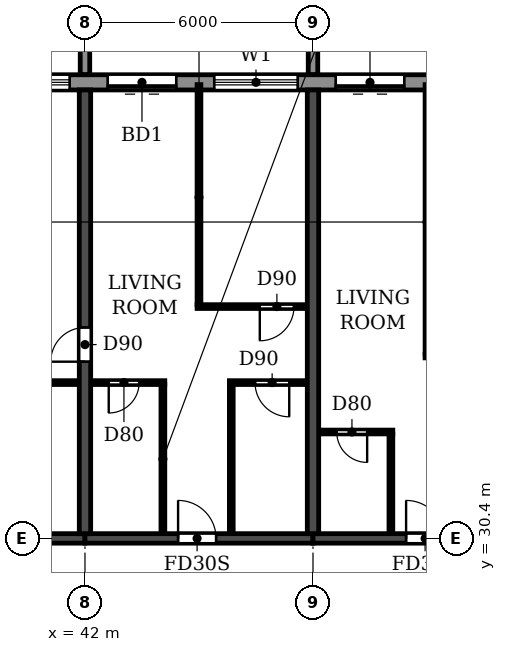
"""IFC4 building model, lengths in metres.
Left out: names, types, materials, properties, quantities, classifications, styles, units other than length and angle.
Written with IfcOpenShell. Run it as: python <this file> out.ifc"""

import sys

from ifc_helpers import new_model, si_unit, direction, frame, frame_2d, origin, place, context, subcontext, project, spatial, polyline, rectangle, outline, extrude, source, transform, mapped, element, fill, save


model = new_model("IFC4")
c1 = context("Model", 3, precision=1e-05, world=origin(), true_north=direction((0.0, 1.0)))
c2 = subcontext(c1, "Body", "Model", "MODEL_VIEW")
j1 = project(units=[si_unit("LENGTHUNIT", "METRE"), si_unit("PLANEANGLEUNIT", "RADIAN")], contexts=[c1])
p1 = place(None, origin())
s1 = spatial("IfcSite", under=j1, at=p1, CompositionType="ELEMENT")
p2 = place(p1, origin())
s2 = spatial("IfcBuilding", under=s1, at=p2, CompositionType="ELEMENT")
p3 = place(p2, frame((0.0, 0.0, 152.1)))
s3 = spatial("IfcBuildingStorey", under=s2, at=p3, CompositionType="ELEMENT", Elevation=152.1)
p4 = place(p3, frame((42.0, 30.525, 0.0), z_axis=(0.0, 0.0, 1.0), x_axis=(0.0, 1.0, 0.0)))
e1 = element("IfcWall", 1, at=p4, inside=s3, PredefinedType="SHEAR", context=c2, shape_type="SweptSolid", body=[
    extrude(rectangle(XDim=11.675, YDim=0.3, at=frame_2d((5.837, 0.0))), origin(), (0.0, 0.0, 1.0), 3.07),
])
p5 = place(p4, frame((4.525, 0.0, 0.0)))
e2 = element("IfcOpeningElement", 2, at=p5, cuts=e1, PredefinedType="OPENING", context=c2, shape_type="SweptSolid", body=[
    extrude(rectangle(XDim=0.9, YDim=2.1, at=frame_2d((0.45, 1.05))), frame((0.0, 0.16, 0.0), z_axis=(0.0, -1.0, 0.0), x_axis=(1.0, 0.0, 0.0)), (0.0, 0.0, 1.0), 0.32),
])
p6 = place(p3, frame((48.0, 30.525, 0.0), z_axis=(0.0, 0.0, 1.0), x_axis=(0.0, 1.0, 0.0)))
e3 = element("IfcWall", 3, at=p6, inside=s3, PredefinedType="SHEAR", context=c2, shape_type="SweptSolid", body=[
    extrude(rectangle(XDim=11.675, YDim=0.3, at=frame_2d((5.837, 0.0))), origin(), (0.0, 0.0, 1.0), 3.07),
])
p7 = place(p3, frame((36.0, 30.4, 0.0), z_axis=(0.0, 0.0, 1.0), x_axis=(1.0, 0.0, 0.0)))
e4 = element("IfcWall", 4, at=p7, inside=s3, PredefinedType="SHEAR", context=c2, shape_type="SweptSolid", body=[
    extrude(rectangle(XDim=6.0, YDim=0.25, at=frame_2d((3.0, 0.0))), origin(), (0.0, 0.0, 1.0), 2.47),
])
p8 = place(p3, frame((42.0, 30.4, 0.0), z_axis=(0.0, 0.0, 1.0), x_axis=(1.0, 0.0, 0.0)))
e5 = element("IfcWall", 5, at=p8, inside=s3, PredefinedType="SHEAR", context=c2, shape_type="SweptSolid", body=[
    extrude(rectangle(XDim=6.0, YDim=0.25, at=frame_2d((3.0, 0.0))), origin(), (0.0, 0.0, 1.0), 2.47),
])
p9 = place(p8, frame((2.45, 0.0, 0.0)))
e6 = element("IfcOpeningElement", 6, at=p9, cuts=e5, PredefinedType="OPENING", context=c2, shape_type="SweptSolid", body=[
    extrude(rectangle(XDim=1.0, YDim=2.1, at=frame_2d((0.5, 1.05))), frame((0.0, 0.135, 0.0), z_axis=(0.0, -1.0, 0.0), x_axis=(1.0, 0.0, 0.0)), (0.0, 0.0, 1.0), 0.27),
])
p10 = place(p3, frame((48.0, 30.4, 0.0), z_axis=(0.0, 0.0, 1.0), x_axis=(1.0, 0.0, 0.0)))
e7 = element("IfcWall", 7, at=p10, inside=s3, PredefinedType="SHEAR", context=c2, shape_type="SweptSolid", body=[
    extrude(rectangle(XDim=6.0, YDim=0.25, at=frame_2d((3.0, 0.0))), origin(), (0.0, 0.0, 1.0), 2.47),
])
p11 = place(p10, frame((2.45, 0.0, 0.0)))
e8 = element("IfcOpeningElement", 8, at=p11, cuts=e7, PredefinedType="OPENING", context=c2, shape_type="SweptSolid", body=[
    extrude(rectangle(XDim=1.0, YDim=2.1, at=frame_2d((0.5, 1.05))), frame((0.0, 0.135, 0.0), z_axis=(0.0, -1.0, 0.0), x_axis=(1.0, 0.0, 0.0)), (0.0, 0.0, 1.0), 0.27),
])
p12 = place(p3, frame((85.317, 42.4, 0.0), z_axis=(0.0, 0.0, 1.0), x_axis=(-1.0, 0.0, 0.0)))
e9 = element("IfcWall", 9, at=p12, inside=s3, PredefinedType="STANDARD", context=c2, shape_type="SweptSolid", body=[
    extrude(rectangle(XDim=68.634, YDim=0.4, at=frame_2d((34.317, 0.0))), origin(), (0.0, 0.0, 1.0), 3.07),
])
p13 = place(p12, frame((64.917, 0.0, 0.0)))
e10 = element("IfcOpeningElement", 10, at=p13, cuts=e9, PredefinedType="OPENING", context=c2, shape_type="SweptSolid", body=[
    extrude(rectangle(XDim=1.8, YDim=2.4, at=frame_2d((0.9, 1.2))), frame((0.0, 0.21, 0.0), z_axis=(0.0, -1.0, 0.0), x_axis=(1.0, 0.0, 0.0)), (0.0, 0.0, 1.0), 0.42),
])
p14 = place(p12, frame((61.717, 0.0, 0.9)))
e11 = element("IfcOpeningElement", 11, at=p14, cuts=e9, PredefinedType="OPENING", context=c2, shape_type="SweptSolid", body=[
    extrude(rectangle(XDim=2.2, YDim=1.5, at=frame_2d((1.1, 0.75))), frame((0.0, 0.21, 0.0), z_axis=(0.0, -1.0, 0.0), x_axis=(1.0, 0.0, 0.0)), (0.0, 0.0, 1.0), 0.42),
])
p15 = place(p12, frame((58.717, 0.0, 0.9)))
e12 = element("IfcOpeningElement", 12, at=p15, cuts=e9, PredefinedType="OPENING", context=c2, shape_type="SweptSolid", body=[
    extrude(rectangle(XDim=2.2, YDim=1.5, at=frame_2d((1.1, 0.75))), frame((0.0, 0.21, 0.0), z_axis=(0.0, -1.0, 0.0), x_axis=(1.0, 0.0, 0.0)), (0.0, 0.0, 1.0), 0.42),
])
p16 = place(p12, frame((55.917, 0.0, 0.0)))
e13 = element("IfcOpeningElement", 13, at=p16, cuts=e9, PredefinedType="OPENING", context=c2, shape_type="SweptSolid", body=[
    extrude(rectangle(XDim=1.8, YDim=2.4, at=frame_2d((0.9, 1.2))), frame((0.0, 0.21, 0.0), z_axis=(0.0, -1.0, 0.0), x_axis=(1.0, 0.0, 0.0)), (0.0, 0.0, 1.0), 0.42),
])
p17 = place(p12, frame((52.917, 0.0, 0.0)))
e14 = element("IfcOpeningElement", 14, at=p17, cuts=e9, PredefinedType="OPENING", context=c2, shape_type="SweptSolid", body=[
    extrude(rectangle(XDim=1.8, YDim=2.4, at=frame_2d((0.9, 1.2))), frame((0.0, 0.21, 0.0), z_axis=(0.0, -1.0, 0.0), x_axis=(1.0, 0.0, 0.0)), (0.0, 0.0, 1.0), 0.42),
])
p18 = place(p12, frame((49.717, 0.0, 0.9)))
e15 = element("IfcOpeningElement", 15, at=p18, cuts=e9, PredefinedType="OPENING", context=c2, shape_type="SweptSolid", body=[
    extrude(rectangle(XDim=2.2, YDim=1.5, at=frame_2d((1.1, 0.75))), frame((0.0, 0.21, 0.0), z_axis=(0.0, -1.0, 0.0), x_axis=(1.0, 0.0, 0.0)), (0.0, 0.0, 1.0), 0.42),
])
p19 = place(p12, frame((46.717, 0.0, 0.9)))
e16 = element("IfcOpeningElement", 16, at=p19, cuts=e9, PredefinedType="OPENING", context=c2, shape_type="SweptSolid", body=[
    extrude(rectangle(XDim=2.2, YDim=1.5, at=frame_2d((1.1, 0.75))), frame((0.0, 0.21, 0.0), z_axis=(0.0, -1.0, 0.0), x_axis=(1.0, 0.0, 0.0)), (0.0, 0.0, 1.0), 0.42),
])
p20 = place(p12, frame((43.717, 0.0, 0.9)))
e17 = element("IfcOpeningElement", 17, at=p20, cuts=e9, PredefinedType="OPENING", context=c2, shape_type="SweptSolid", body=[
    extrude(rectangle(XDim=2.2, YDim=1.5, at=frame_2d((1.1, 0.75))), frame((0.0, 0.21, 0.0), z_axis=(0.0, -1.0, 0.0), x_axis=(1.0, 0.0, 0.0)), (0.0, 0.0, 1.0), 0.42),
])
p21 = place(p12, frame((40.917, 0.0, 0.0)))
e18 = element("IfcOpeningElement", 18, at=p21, cuts=e9, PredefinedType="OPENING", context=c2, shape_type="SweptSolid", body=[
    extrude(rectangle(XDim=1.8, YDim=2.4, at=frame_2d((0.9, 1.2))), frame((0.0, 0.21, 0.0), z_axis=(0.0, -1.0, 0.0), x_axis=(1.0, 0.0, 0.0)), (0.0, 0.0, 1.0), 0.42),
])
p22 = place(p12, frame((37.717, 0.0, 0.9)))
e19 = element("IfcOpeningElement", 19, at=p22, cuts=e9, PredefinedType="OPENING", context=c2, shape_type="SweptSolid", body=[
    extrude(rectangle(XDim=2.2, YDim=1.5, at=frame_2d((1.1, 0.75))), frame((0.0, 0.21, 0.0), z_axis=(0.0, -1.0, 0.0), x_axis=(1.0, 0.0, 0.0)), (0.0, 0.0, 1.0), 0.42),
])
p23 = place(p12, frame((34.917, 0.0, 0.0)))
e20 = element("IfcOpeningElement", 20, at=p23, cuts=e9, PredefinedType="OPENING", context=c2, shape_type="SweptSolid", body=[
    extrude(rectangle(XDim=1.8, YDim=2.4, at=frame_2d((0.9, 1.2))), frame((0.0, 0.21, 0.0), z_axis=(0.0, -1.0, 0.0), x_axis=(1.0, 0.0, 0.0)), (0.0, 0.0, 1.0), 0.42),
])
p24 = place(p12, frame((31.717, 0.0, 0.9)))
e21 = element("IfcOpeningElement", 21, at=p24, cuts=e9, PredefinedType="OPENING", context=c2, shape_type="SweptSolid", body=[
    extrude(rectangle(XDim=2.2, YDim=1.5, at=frame_2d((1.1, 0.75))), frame((0.0, 0.21, 0.0), z_axis=(0.0, -1.0, 0.0), x_axis=(1.0, 0.0, 0.0)), (0.0, 0.0, 1.0), 0.42),
])
p25 = place(p12, frame((28.717, 0.0, 0.9)))
e22 = element("IfcOpeningElement", 22, at=p25, cuts=e9, PredefinedType="OPENING", context=c2, shape_type="SweptSolid", body=[
    extrude(rectangle(XDim=2.2, YDim=1.5, at=frame_2d((1.1, 0.75))), frame((0.0, 0.21, 0.0), z_axis=(0.0, -1.0, 0.0), x_axis=(1.0, 0.0, 0.0)), (0.0, 0.0, 1.0), 0.42),
])
p26 = place(p12, frame((25.717, 0.0, 0.9)))
e23 = element("IfcOpeningElement", 23, at=p26, cuts=e9, PredefinedType="OPENING", context=c2, shape_type="SweptSolid", body=[
    extrude(rectangle(XDim=2.2, YDim=1.5, at=frame_2d((1.1, 0.75))), frame((0.0, 0.21, 0.0), z_axis=(0.0, -1.0, 0.0), x_axis=(1.0, 0.0, 0.0)), (0.0, 0.0, 1.0), 0.42),
])
p27 = place(p12, frame((22.717, 0.0, 0.9)))
e24 = element("IfcOpeningElement", 24, at=p27, cuts=e9, PredefinedType="OPENING", context=c2, shape_type="SweptSolid", body=[
    extrude(rectangle(XDim=2.2, YDim=1.5, at=frame_2d((1.1, 0.75))), frame((0.0, 0.21, 0.0), z_axis=(0.0, -1.0, 0.0), x_axis=(1.0, 0.0, 0.0)), (0.0, 0.0, 1.0), 0.42),
])
p28 = place(p12, frame((19.917, 0.0, 0.0)))
e25 = element("IfcOpeningElement", 25, at=p28, cuts=e9, PredefinedType="OPENING", context=c2, shape_type="SweptSolid", body=[
    extrude(rectangle(XDim=1.8, YDim=2.4, at=frame_2d((0.9, 1.2))), frame((0.0, 0.21, 0.0), z_axis=(0.0, -1.0, 0.0), x_axis=(1.0, 0.0, 0.0)), (0.0, 0.0, 1.0), 0.42),
])
p29 = place(p12, frame((16.717, 0.0, 0.9)))
e26 = element("IfcOpeningElement", 26, at=p29, cuts=e9, PredefinedType="OPENING", context=c2, shape_type="SweptSolid", body=[
    extrude(rectangle(XDim=2.2, YDim=1.5, at=frame_2d((1.1, 0.75))), frame((0.0, 0.21, 0.0), z_axis=(0.0, -1.0, 0.0), x_axis=(1.0, 0.0, 0.0)), (0.0, 0.0, 1.0), 0.42),
])
p30 = place(p12, frame((13.717, 0.0, 0.9)))
e27 = element("IfcOpeningElement", 27, at=p30, cuts=e9, PredefinedType="OPENING", context=c2, shape_type="SweptSolid", body=[
    extrude(rectangle(XDim=2.2, YDim=1.5, at=frame_2d((1.1, 0.75))), frame((0.0, 0.21, 0.0), z_axis=(0.0, -1.0, 0.0), x_axis=(1.0, 0.0, 0.0)), (0.0, 0.0, 1.0), 0.42),
])
p31 = place(p12, frame((10.917, 0.0, 0.0)))
e28 = element("IfcOpeningElement", 28, at=p31, cuts=e9, PredefinedType="OPENING", context=c2, shape_type="SweptSolid", body=[
    extrude(rectangle(XDim=1.8, YDim=2.4, at=frame_2d((0.9, 1.2))), frame((0.0, 0.21, 0.0), z_axis=(0.0, -1.0, 0.0), x_axis=(1.0, 0.0, 0.0)), (0.0, 0.0, 1.0), 0.42),
])
p32 = place(p12, frame((7.717, 0.0, 0.9)))
e29 = element("IfcOpeningElement", 29, at=p32, cuts=e9, PredefinedType="OPENING", context=c2, shape_type="SweptSolid", body=[
    extrude(rectangle(XDim=2.2, YDim=1.5, at=frame_2d((1.1, 0.75))), frame((0.0, 0.21, 0.0), z_axis=(0.0, -1.0, 0.0), x_axis=(1.0, 0.0, 0.0)), (0.0, 0.0, 1.0), 0.42),
])
p33 = place(p12, frame((4.717, 0.0, 0.9)))
e30 = element("IfcOpeningElement", 30, at=p33, cuts=e9, PredefinedType="OPENING", context=c2, shape_type="SweptSolid", body=[
    extrude(rectangle(XDim=2.2, YDim=1.5, at=frame_2d((1.1, 0.75))), frame((0.0, 0.21, 0.0), z_axis=(0.0, -1.0, 0.0), x_axis=(1.0, 0.0, 0.0)), (0.0, 0.0, 1.0), 0.42),
])
p34 = place(p12, frame((1.917, 0.0, 0.0)))
e31 = element("IfcOpeningElement", 31, at=p34, cuts=e9, PredefinedType="OPENING", context=c2, shape_type="SweptSolid", body=[
    extrude(rectangle(XDim=1.8, YDim=2.4, at=frame_2d((0.9, 1.2))), frame((0.0, 0.21, 0.0), z_axis=(0.0, -1.0, 0.0), x_axis=(1.0, 0.0, 0.0)), (0.0, 0.0, 1.0), 0.42),
])
m1 = source(origin(), c2, "Body", "SweptSolid", [
    extrude(outline(polyline([(0.0, 0.0), (0.25, 0.0), (0.25, 3.1), (0.0, 3.1), (0.0, 0.0)])), origin(), (0.0, 0.0, 1.0), 3.1),
])
for number, where in (
    (32, (41.875, 42.6, 0.0)),
    (33, (47.875, 42.6, 0.0)),
):
    element("IfcWall", number, at=place(p3, frame(where)), inside=s3, PredefinedType="STANDARD", context=c2, shape_type="MappedRepresentation", body=[
        mapped(m1, transform((0.0, 0.0, 0.0))),
    ])
p35 = place(p3, frame((48.16, 33.2, 0.0), z_axis=(0.0, 0.0, 1.0), x_axis=(1.0, 0.0, 0.0)))
e34 = element("IfcWall", 34, at=p35, inside=s3, PredefinedType="PARTITIONING", context=c2, shape_type="SweptSolid", body=[
    extrude(rectangle(XDim=1.94, YDim=0.1, at=frame_2d((0.97, 0.0))), origin(), (0.0, 0.0, 1.0), 3.07),
])
p36 = place(p35, frame((0.465, 0.0, 0.0)))
e35 = element("IfcOpeningElement", 35, at=p36, cuts=e34, PredefinedType="OPENING", context=c2, shape_type="SweptSolid", body=[
    extrude(rectangle(XDim=0.8, YDim=2.1, at=frame_2d((0.4, 1.05))), frame((0.0, 0.06, 0.0), z_axis=(0.0, -1.0, 0.0), x_axis=(1.0, 0.0, 0.0)), (0.0, 0.0, 1.0), 0.12),
])
p37 = place(p3, frame((38.9, 34.5, 0.0), z_axis=(0.0, 0.0, 1.0), x_axis=(1.0, 0.0, 0.0)))
e36 = element("IfcWall", 36, at=p37, inside=s3, PredefinedType="PARTITIONING", context=c2, shape_type="SweptSolid", body=[
    extrude(rectangle(XDim=2.94, YDim=0.1, at=frame_2d((1.47, 0.0))), origin(), (0.0, 0.0, 1.0), 3.07),
])
p38 = place(p37, frame((1.2, 0.0, 0.0)))
e37 = element("IfcOpeningElement", 37, at=p38, cuts=e36, PredefinedType="OPENING", context=c2, shape_type="SweptSolid", body=[
    extrude(rectangle(XDim=0.8, YDim=2.1, at=frame_2d((0.4, 1.05))), frame((0.0, 0.06, 0.0), z_axis=(0.0, -1.0, 0.0), x_axis=(1.0, 0.0, 0.0)), (0.0, 0.0, 1.0), 0.12),
])
p39 = place(p3, frame((42.16, 34.5, 0.0), z_axis=(0.0, 0.0, 1.0), x_axis=(1.0, 0.0, 0.0)))
e38 = element("IfcWall", 38, at=p39, inside=s3, PredefinedType="PARTITIONING", context=c2, shape_type="SweptSolid", body=[
    extrude(rectangle(XDim=1.94, YDim=0.1, at=frame_2d((0.97, 0.0))), origin(), (0.0, 0.0, 1.0), 3.07),
])
p40 = place(p39, frame((0.465, 0.0, 0.0)))
e39 = element("IfcOpeningElement", 39, at=p40, cuts=e38, PredefinedType="OPENING", context=c2, shape_type="SweptSolid", body=[
    extrude(rectangle(XDim=0.8, YDim=2.1, at=frame_2d((0.4, 1.05))), frame((0.0, 0.06, 0.0), z_axis=(0.0, -1.0, 0.0), x_axis=(1.0, 0.0, 0.0)), (0.0, 0.0, 1.0), 0.12),
])
p41 = place(p3, frame((45.8, 34.5, 0.0), z_axis=(0.0, 0.0, 1.0), x_axis=(1.0, 0.0, 0.0)))
e40 = element("IfcWall", 40, at=p41, inside=s3, PredefinedType="PARTITIONING", context=c2, shape_type="SweptSolid", body=[
    extrude(rectangle(XDim=2.04, YDim=0.1, at=frame_2d((1.02, 0.0))), origin(), (0.0, 0.0, 1.0), 3.07),
])
p42 = place(p41, frame((0.675, 0.0, 0.0)))
e41 = element("IfcOpeningElement", 41, at=p42, cuts=e40, PredefinedType="OPENING", context=c2, shape_type="SweptSolid", body=[
    extrude(rectangle(XDim=0.9, YDim=2.1, at=frame_2d((0.45, 1.05))), frame((0.0, 0.06, 0.0), z_axis=(0.0, -1.0, 0.0), x_axis=(1.0, 0.0, 0.0)), (0.0, 0.0, 1.0), 0.12),
])
p43 = place(p3, frame((50.95, 35.2, 0.0), z_axis=(0.0, 0.0, 1.0), x_axis=(1.0, 0.0, 0.0)))
e42 = element("IfcWall", 42, at=p43, inside=s3, PredefinedType="PARTITIONING", context=c2, shape_type="SweptSolid", body=[
    extrude(rectangle(XDim=2.89, YDim=0.1, at=frame_2d((1.445, 0.0))), origin(), (0.0, 0.0, 1.0), 3.07),
])
p44 = place(p43, frame((0.55, 0.0, 0.0)))
e43 = element("IfcOpeningElement", 43, at=p44, cuts=e42, PredefinedType="OPENING", context=c2, shape_type="SweptSolid", body=[
    extrude(rectangle(XDim=0.9, YDim=2.1, at=frame_2d((0.45, 1.05))), frame((0.0, 0.06, 0.0), z_axis=(0.0, -1.0, 0.0), x_axis=(1.0, 0.0, 0.0)), (0.0, 0.0, 1.0), 0.12),
])
p45 = place(p3, frame((44.95, 36.5, 0.0), z_axis=(0.0, 0.0, 1.0), x_axis=(1.0, 0.0, 0.0)))
e44 = element("IfcWall", 44, at=p45, inside=s3, PredefinedType="PARTITIONING", context=c2, shape_type="SweptSolid", body=[
    extrude(rectangle(XDim=2.89, YDim=0.1, at=frame_2d((1.445, 0.0))), origin(), (0.0, 0.0, 1.0), 3.07),
])
p46 = place(p45, frame((1.65, 0.0, 0.0)))
e45 = element("IfcOpeningElement", 45, at=p46, cuts=e44, PredefinedType="OPENING", context=c2, shape_type="SweptSolid", body=[
    extrude(rectangle(XDim=0.9, YDim=2.1, at=frame_2d((0.45, 1.05))), frame((0.0, 0.06, 0.0), z_axis=(0.0, -1.0, 0.0), x_axis=(1.0, 0.0, 0.0)), (0.0, 0.0, 1.0), 0.12),
])
p47 = place(p3, frame((44.05, 30.535, 0.0), z_axis=(0.0, 0.0, 1.0), x_axis=(0.0, 1.0, 0.0)))
e46 = element("IfcWall", 46, at=p47, inside=s3, PredefinedType="PARTITIONING", context=c2, shape_type="SweptSolid", body=[
    extrude(rectangle(XDim=3.915, YDim=0.1, at=frame_2d((1.958, 0.0))), origin(), (0.0, 0.0, 1.0), 3.07),
])
p48 = place(p3, frame((45.0, 36.55, 0.0), z_axis=(0.0, 0.0, 1.0), x_axis=(0.0, 1.0, 0.0)))
e47 = element("IfcWall", 47, at=p48, inside=s3, PredefinedType="PARTITIONING", context=c2, shape_type="SweptSolid", body=[
    extrude(rectangle(XDim=5.79, YDim=0.1, at=frame_2d((2.895, 0.0))), origin(), (0.0, 0.0, 1.0), 3.07),
])
p49 = place(p3, frame((45.85, 30.535, 0.0), z_axis=(0.0, 0.0, 1.0), x_axis=(0.0, 1.0, 0.0)))
e48 = element("IfcWall", 48, at=p49, inside=s3, PredefinedType="PARTITIONING", context=c2, shape_type="SweptSolid", body=[
    extrude(rectangle(XDim=3.915, YDim=0.1, at=frame_2d((1.958, 0.0))), origin(), (0.0, 0.0, 1.0), 3.07),
])
p50 = place(p3, frame((50.05, 30.535, 0.0), z_axis=(0.0, 0.0, 1.0), x_axis=(0.0, 1.0, 0.0)))
e49 = element("IfcWall", 49, at=p50, inside=s3, PredefinedType="PARTITIONING", context=c2, shape_type="SweptSolid", body=[
    extrude(rectangle(XDim=2.615, YDim=0.1, at=frame_2d((1.308, 0.0))), origin(), (0.0, 0.0, 1.0), 3.07),
])
p51 = place(p3, frame((51.0, 35.25, 0.0), z_axis=(0.0, 0.0, 1.0), x_axis=(0.0, 1.0, 0.0)))
e50 = element("IfcWall", 50, at=p51, inside=s3, PredefinedType="PARTITIONING", context=c2, shape_type="SweptSolid", body=[
    extrude(rectangle(XDim=7.09, YDim=0.1, at=frame_2d((3.545, 0.0))), origin(), (0.0, 0.0, 1.0), 3.07),
])
p52 = place(p20, origin())
e51 = element("IfcWindow", 51, at=p52, inside=s3, PartitioningType="DOUBLE_PANEL_HORIZONTAL", PredefinedType="WINDOW", context=c2, shape_type="SweptSolid", body=[
    extrude(rectangle(XDim=2.2, YDim=1.5, at=frame_2d((1.1, 0.75))), frame((0.0, 0.03, 0.0), z_axis=(0.0, -1.0, 0.0), x_axis=(1.0, 0.0, 0.0)), (0.0, 0.0, 1.0), 0.06),
])
fill(e17, e51)
p53 = place(p21, origin())
e52 = element("IfcDoor", 52, at=p53, inside=s3, OperationType="DOUBLE_DOOR_SLIDING", PredefinedType="DOOR", context=c2, shape_type="SweptSolid", body=[
    extrude(rectangle(XDim=1.8, YDim=2.4, at=frame_2d((0.9, 1.2))), frame((0.0, 0.025, 0.0), z_axis=(0.0, -1.0, 0.0), x_axis=(1.0, 0.0, 0.0)), (0.0, 0.0, 1.0), 0.05),
])
fill(e18, e52)
p54 = place(p22, origin())
e53 = element("IfcWindow", 53, at=p54, inside=s3, PartitioningType="DOUBLE_PANEL_HORIZONTAL", PredefinedType="WINDOW", context=c2, shape_type="SweptSolid", body=[
    extrude(rectangle(XDim=2.2, YDim=1.5, at=frame_2d((1.1, 0.75))), frame((0.0, 0.03, 0.0), z_axis=(0.0, -1.0, 0.0), x_axis=(1.0, 0.0, 0.0)), (0.0, 0.0, 1.0), 0.06),
])
fill(e19, e53)
p55 = place(p23, origin())
e54 = element("IfcDoor", 54, at=p55, inside=s3, OperationType="DOUBLE_DOOR_SLIDING", PredefinedType="DOOR", context=c2, shape_type="SweptSolid", body=[
    extrude(rectangle(XDim=1.8, YDim=2.4, at=frame_2d((0.9, 1.2))), frame((0.0, 0.025, 0.0), z_axis=(0.0, -1.0, 0.0), x_axis=(1.0, 0.0, 0.0)), (0.0, 0.0, 1.0), 0.05),
])
fill(e20, e54)
p56 = place(p5, origin())
e55 = element("IfcDoor", 55, at=p56, inside=s3, OperationType="SINGLE_SWING_LEFT", PredefinedType="DOOR", context=c2, shape_type="SweptSolid", body=[
    extrude(rectangle(XDim=0.9, YDim=2.1, at=frame_2d((0.45, 1.05))), frame((0.0, 0.025, 0.0), z_axis=(0.0, -1.0, 0.0), x_axis=(1.0, 0.0, 0.0)), (0.0, 0.0, 1.0), 0.05),
])
fill(e2, e55)
p57 = place(p40, frame((0.8, 0.0, 0.0), z_axis=(0.0, 0.0, 1.0), x_axis=(-1.0, 0.0, 0.0)))
e56 = element("IfcDoor", 56, at=p57, inside=s3, OperationType="SINGLE_SWING_RIGHT", PredefinedType="DOOR", context=c2, shape_type="SweptSolid", body=[
    extrude(rectangle(XDim=0.8, YDim=2.1, at=frame_2d((0.4, 1.05))), frame((0.0, 0.025, 0.0), z_axis=(0.0, -1.0, 0.0), x_axis=(1.0, 0.0, 0.0)), (0.0, 0.0, 1.0), 0.05),
])
fill(e39, e56)
p58 = place(p9, origin())
e57 = element("IfcDoor", 57, at=p58, inside=s3, OperationType="SINGLE_SWING_LEFT", PredefinedType="DOOR", context=c2, shape_type="SweptSolid", body=[
    extrude(rectangle(XDim=1.0, YDim=2.1, at=frame_2d((0.5, 1.05))), frame((0.0, 0.025, 0.0), z_axis=(0.0, -1.0, 0.0), x_axis=(1.0, 0.0, 0.0)), (0.0, 0.0, 1.0), 0.05),
])
fill(e6, e57)
p59 = place(p42, frame((0.9, 0.0, 0.0), z_axis=(0.0, 0.0, 1.0), x_axis=(-1.0, 0.0, 0.0)))
e58 = element("IfcDoor", 58, at=p59, inside=s3, OperationType="SINGLE_SWING_LEFT", PredefinedType="DOOR", context=c2, shape_type="SweptSolid", body=[
    extrude(rectangle(XDim=0.9, YDim=2.1, at=frame_2d((0.45, 1.05))), frame((0.0, 0.025, 0.0), z_axis=(0.0, -1.0, 0.0), x_axis=(1.0, 0.0, 0.0)), (0.0, 0.0, 1.0), 0.05),
])
fill(e41, e58)
p60 = place(p46, frame((0.9, 0.0, 0.0), z_axis=(0.0, 0.0, 1.0), x_axis=(-1.0, 0.0, 0.0)))
e59 = element("IfcDoor", 59, at=p60, inside=s3, OperationType="SINGLE_SWING_RIGHT", PredefinedType="DOOR", context=c2, shape_type="SweptSolid", body=[
    extrude(rectangle(XDim=0.9, YDim=2.1, at=frame_2d((0.45, 1.05))), frame((0.0, 0.025, 0.0), z_axis=(0.0, -1.0, 0.0), x_axis=(1.0, 0.0, 0.0)), (0.0, 0.0, 1.0), 0.05),
])
fill(e45, e59)
p61 = place(p36, frame((0.8, 0.0, 0.0), z_axis=(0.0, 0.0, 1.0), x_axis=(-1.0, 0.0, 0.0)))
e60 = element("IfcDoor", 60, at=p61, inside=s3, OperationType="SINGLE_SWING_LEFT", PredefinedType="DOOR", context=c2, shape_type="SweptSolid", body=[
    extrude(rectangle(XDim=0.8, YDim=2.1, at=frame_2d((0.4, 1.05))), frame((0.0, 0.025, 0.0), z_axis=(0.0, -1.0, 0.0), x_axis=(1.0, 0.0, 0.0)), (0.0, 0.0, 1.0), 0.05),
])
fill(e35, e60)
p62 = place(p11, origin())
e61 = element("IfcDoor", 61, at=p62, inside=s3, OperationType="SINGLE_SWING_LEFT", PredefinedType="DOOR", context=c2, shape_type="SweptSolid", body=[
    extrude(rectangle(XDim=1.0, YDim=2.1, at=frame_2d((0.5, 1.05))), frame((0.0, 0.025, 0.0), z_axis=(0.0, -1.0, 0.0), x_axis=(1.0, 0.0, 0.0)), (0.0, 0.0, 1.0), 0.05),
])
fill(e8, e61)
save(model, sys.argv[1])
